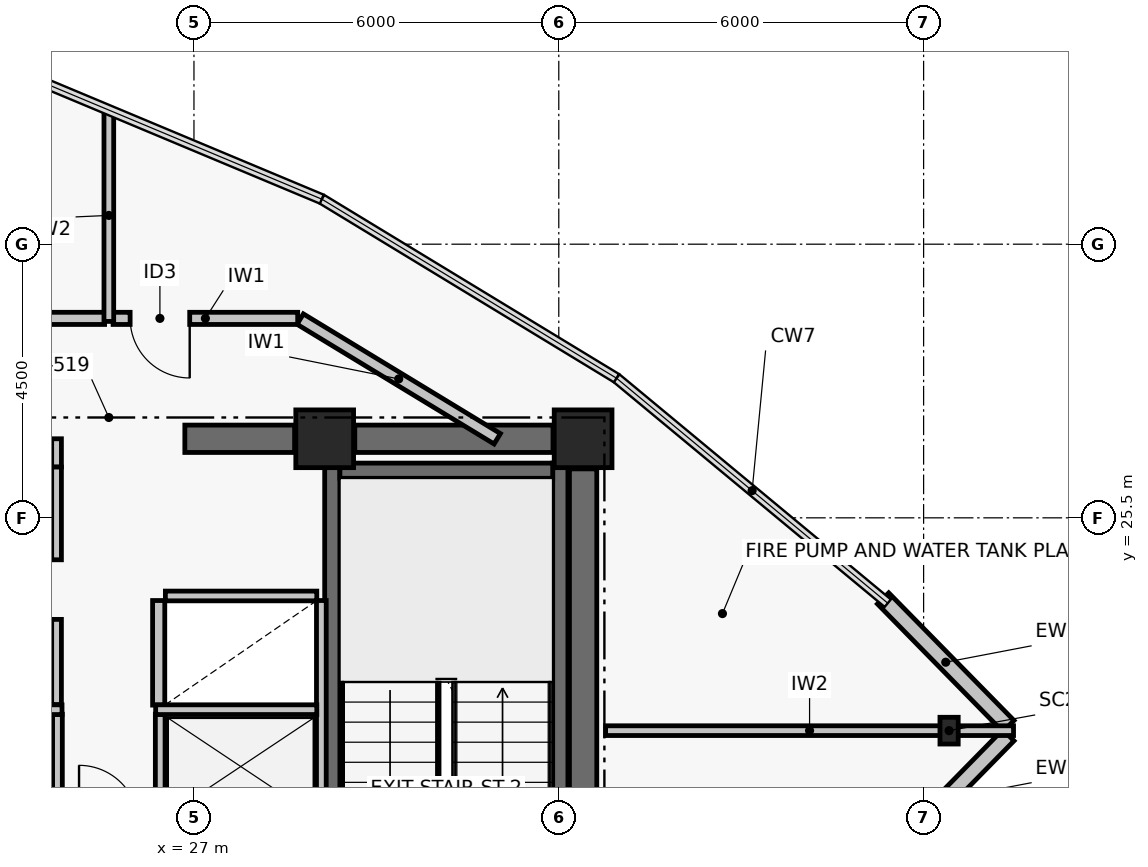
"""IFC4 building model, lengths in metres.
Left out: names, types, materials, properties, quantities, classifications, styles, units other than length and angle.
Written with IfcOpenShell. Run it as: python <this file> out.ifc"""

import sys

from ifc_helpers import new_model, si_unit, direction, frame, frame_2d, origin, origin_2d, place, context, subcontext, project, spatial, rectangle, i_section, extrude, element, fill, save


model = new_model("IFC4")
c1 = context("Model", 3, precision=1e-05, world=origin(), true_north=direction((0.0, 1.0)))
c2 = subcontext(c1, "Body", "Model", "MODEL_VIEW")
j1 = project(units=[si_unit("LENGTHUNIT", "METRE"), si_unit("PLANEANGLEUNIT", "RADIAN")], contexts=[c1])
p1 = place(None, origin())
s1 = spatial("IfcSite", under=j1, at=p1, CompositionType="ELEMENT")
p2 = place(p1, origin())
s2 = spatial("IfcBuilding", under=s1, at=p2, CompositionType="ELEMENT")
p3 = place(p2, frame((0.0, 0.0, 299.22)))
s3 = spatial("IfcBuildingStorey", under=s2, at=p3, CompositionType="ELEMENT", Elevation=299.22)
for number, where, z_axis, x_axis in (
    (1, (29.15, 26.8, 0.0), (0.0, 0.0, 1.0), (1.0, 0.0, 0.0)),
    (2, (33.4, 26.8, 0.0), (0.0, 0.0, 1.0), (1.0, 0.0, 0.0)),
):
    element("IfcColumn", number, at=place(p3, frame(where, z_axis=z_axis, x_axis=x_axis)), inside=s3, PredefinedType="COLUMN", context=c2, shape_type="SweptSolid", body=[
        extrude(rectangle(XDim=0.95, YDim=0.95, at=origin_2d()), origin(), (0.0, 0.0, 1.0), 3.2),
    ])
p4 = place(p3, frame((26.85, 26.8, 0.0), z_axis=(0.0, 0.0, 1.0), x_axis=(1.0, 0.0, 0.0)))
e3 = element("IfcWall", 3, at=p4, inside=s3, PredefinedType="SHEAR", context=c2, shape_type="SweptSolid", body=[
    extrude(rectangle(XDim=1.805, YDim=0.45, at=frame_2d((0.902, 0.0))), origin(), (0.0, 0.0, 1.0), 2.98),
])
p5 = place(p3, frame((29.645, 26.8, 0.0), z_axis=(0.0, 0.0, 1.0), x_axis=(1.0, 0.0, 0.0)))
e4 = element("IfcWall", 4, at=p5, inside=s3, PredefinedType="SHEAR", context=c2, shape_type="SweptSolid", body=[
    extrude(rectangle(XDim=3.26, YDim=0.45, at=frame_2d((1.63, 0.0))), origin(), (0.0, 0.0, 1.0), 2.98),
])
p6 = place(p3, frame((33.4, 17.695, 0.0), z_axis=(0.0, 0.0, 1.0), x_axis=(0.0, 1.0, 0.0)))
e5 = element("IfcWall", 5, at=p6, inside=s3, PredefinedType="SHEAR", context=c2, shape_type="SweptSolid", body=[
    extrude(rectangle(XDim=8.61, YDim=0.45, at=frame_2d((4.305, 0.0))), origin(), (0.0, 0.0, 1.0), 2.98),
])
p7 = place(p3, frame((29.275, 17.6, 0.0), z_axis=(0.0, 0.0, 1.0), x_axis=(0.0, 1.0, 0.0)))
e6 = element("IfcWall", 6, at=p7, inside=s3, PredefinedType="SHEAR", context=c2, shape_type="SweptSolid", body=[
    extrude(rectangle(XDim=8.8, YDim=0.25, at=frame_2d((4.4, 0.0))), origin(), (0.0, 0.0, 1.0), 2.98),
])
p8 = place(p7, frame((0.35, 0.0, 0.0)))
e7 = element("IfcOpeningElement", 7, at=p8, cuts=e6, PredefinedType="OPENING", context=c2, shape_type="SweptSolid", body=[
    extrude(rectangle(XDim=1.05, YDim=2.08, at=frame_2d((0.525, 1.04))), frame((0.0, 0.135, 0.0), z_axis=(0.0, -1.0, 0.0), x_axis=(1.0, 0.0, 0.0)), (0.0, 0.0, 1.0), 0.27),
])
p9 = place(p3, frame((33.025, 17.6, 0.0), z_axis=(0.0, 0.0, 1.0), x_axis=(0.0, 1.0, 0.0)))
e8 = element("IfcWall", 8, at=p9, inside=s3, PredefinedType="SHEAR", context=c2, shape_type="SweptSolid", body=[
    extrude(rectangle(XDim=8.8, YDim=0.25, at=frame_2d((4.4, 0.0))), origin(), (0.0, 0.0, 1.0), 2.98),
])
p10 = place(p3, frame((29.4, 26.275, 0.0), z_axis=(0.0, 0.0, 1.0), x_axis=(1.0, 0.0, 0.0)))
e9 = element("IfcWall", 9, at=p10, inside=s3, PredefinedType="SHEAR", context=c2, shape_type="SweptSolid", body=[
    extrude(rectangle(XDim=3.5, YDim=0.25, at=frame_2d((1.75, 0.0))), origin(), (0.0, 0.0, 1.0), 2.98),
])
p11 = place(p3, frame((39.419, 22.0, 0.0), z_axis=(0.0, 0.0, 1.0), x_axis=(1.0, 0.0, 0.0)))
e10 = element("IfcColumn", 10, at=p11, inside=s3, PredefinedType="COLUMN", context=c2, shape_type="SweptSolid", body=[
    extrude(i_section(OverallWidth=0.3, OverallDepth=0.44, WebThickness=0.011, FlangeThickness=0.018, at=origin_2d()), origin(), (0.0, 0.0, 1.0), 3.2),
])
for number, where, z_axis, x_axis in (
    (11, (40.394, 21.924, 0.0), (0.0, 0.0, 1.0), (-0.701, -0.714, 0.0)),
    (12, (38.333, 24.175, 0.0), (0.0, 0.0, 1.0), (0.701, -0.714, 0.0)),
):
    element("IfcWall", number, at=place(p3, frame(where, z_axis=z_axis, x_axis=x_axis)), inside=s3, PredefinedType="PARTITIONING", context=c2, shape_type="SweptSolid", body=[
        extrude(rectangle(XDim=2.941, YDim=0.26, at=frame_2d((1.471, 0.0))), origin(), (0.0, 0.0, 1.0), 2.98),
    ])
p12 = place(p3, frame((26.42, 22.42, 0.0), z_axis=(0.0, 0.0, 1.0), x_axis=(0.0, 1.0, 0.0)))
e13 = element("IfcWall", 13, at=p12, inside=s3, PredefinedType="PARTITIONING", context=c2, shape_type="SweptSolid", body=[
    extrude(rectangle(XDim=1.72, YDim=0.2, at=frame_2d((0.86, 0.0))), origin(), (0.0, 0.0, 1.0), 2.98),
])
p13 = place(p3, frame((24.755, 20.56, 0.0), z_axis=(0.0, 0.0, 1.0), x_axis=(0.0, 1.0, 0.0)))
e14 = element("IfcWall", 14, at=p13, inside=s3, PredefinedType="PARTITIONING", context=c2, shape_type="SweptSolid", body=[
    extrude(rectangle(XDim=1.71, YDim=0.16, at=frame_2d((0.855, 0.0))), origin(), (0.0, 0.0, 1.0), 2.98),
])
p14 = place(p3, frame((22.18, 22.345, 0.0), z_axis=(0.0, 0.0, 1.0), x_axis=(1.0, 0.0, 0.0)))
e15 = element("IfcWall", 15, at=p14, inside=s3, PredefinedType="PARTITIONING", context=c2, shape_type="SweptSolid", body=[
    extrude(rectangle(XDim=2.65, YDim=0.16, at=frame_2d((1.325, 0.0))), origin(), (0.0, 0.0, 1.0), 2.98),
])
p15 = place(p3, frame((29.095, 20.56, 0.0), z_axis=(0.0, 0.0, 1.0), x_axis=(0.0, 1.0, 0.0)))
e16 = element("IfcWall", 16, at=p15, inside=s3, PredefinedType="PARTITIONING", context=c2, shape_type="SweptSolid", body=[
    extrude(rectangle(XDim=3.58, YDim=0.16, at=frame_2d((1.79, 0.0))), origin(), (0.0, 0.0, 1.0), 2.98),
])
p16 = place(p3, frame((26.445, 20.56, 0.0), z_axis=(0.0, 0.0, 1.0), x_axis=(0.0, 1.0, 0.0)))
e17 = element("IfcWall", 17, at=p16, inside=s3, PredefinedType="PARTITIONING", context=c2, shape_type="SweptSolid", body=[
    extrude(rectangle(XDim=1.71, YDim=0.16, at=frame_2d((0.855, 0.0))), origin(), (0.0, 0.0, 1.0), 2.98),
])
p17 = place(p3, frame((26.37, 22.345, 0.0), z_axis=(0.0, 0.0, 1.0), x_axis=(1.0, 0.0, 0.0)))
e18 = element("IfcWall", 18, at=p17, inside=s3, PredefinedType="PARTITIONING", context=c2, shape_type="SweptSolid", body=[
    extrude(rectangle(XDim=2.65, YDim=0.16, at=frame_2d((1.325, 0.0))), origin(), (0.0, 0.0, 1.0), 2.98),
])
p18 = place(p3, frame((26.53, 24.215, 0.0), z_axis=(0.0, 0.0, 1.0), x_axis=(1.0, 0.0, 0.0)))
e19 = element("IfcWall", 19, at=p18, inside=s3, PredefinedType="PARTITIONING", context=c2, shape_type="SweptSolid", body=[
    extrude(rectangle(XDim=2.49, YDim=0.16, at=frame_2d((1.245, 0.0))), origin(), (0.0, 0.0, 1.0), 2.98),
])
p19 = place(p3, frame((24.74, 26.335, 0.0), z_axis=(0.0, 0.0, 1.0), x_axis=(0.0, 1.0, 0.0)))
e20 = element("IfcWall", 20, at=p19, inside=s3, PredefinedType="PARTITIONING", context=c2, shape_type="SweptSolid", body=[
    extrude(rectangle(XDim=0.465, YDim=0.16, at=frame_2d((0.232, 0.0))), origin(), (0.0, 0.0, 1.0), 2.11),
])
p20 = place(p3, frame((24.74, 22.43, 0.0), z_axis=(0.0, 0.0, 1.0), x_axis=(0.0, 1.0, 0.0)))
e21 = element("IfcWall", 21, at=p20, inside=s3, PredefinedType="PARTITIONING", context=c2, shape_type="SweptSolid", body=[
    extrude(rectangle(XDim=3.905, YDim=0.16, at=frame_2d((1.953, 0.0))), origin(), (0.0, 0.0, 1.0), 2.98),
])
p21 = place(p20, frame((1.4, 0.0, 0.0)))
e22 = element("IfcOpeningElement", 22, at=p21, cuts=e21, PredefinedType="OPENING", context=c2, shape_type="SweptSolid", body=[
    extrude(rectangle(XDim=0.98, YDim=2.06, at=frame_2d((0.49, 1.03))), frame((0.0, 0.09, 0.0), z_axis=(0.0, -1.0, 0.0), x_axis=(1.0, 0.0, 0.0)), (0.0, 0.0, 1.0), 0.18),
])
p22 = place(p3, frame((31.988, 26.8, 0.0), z_axis=(0.0, 0.0, 1.0), x_axis=(-0.854690580489, 0.519137757847, 0.0)))
e23 = element("IfcWall", 23, at=p22, inside=s3, PredefinedType="PARTITIONING", context=c2, shape_type="SweptSolid", body=[
    extrude(rectangle(XDim=3.792, YDim=0.2, at=frame_2d((1.896, 0.0))), origin(), (0.0, 0.0, 1.0), 2.11),
])
p23 = place(p3, frame((28.706, 28.78, 0.0), z_axis=(0.0, 0.0, 1.0), x_axis=(-1.0, 0.0, 0.0)))
e24 = element("IfcWall", 24, at=p23, inside=s3, PredefinedType="PARTITIONING", context=c2, shape_type="SweptSolid", body=[
    extrude(rectangle(XDim=3.036, YDim=0.2, at=frame_2d((1.518, 0.0))), origin(), (0.0, 0.0, 1.0), 2.98),
])
p24 = place(p23, frame((1.776, 0.0, 0.0)))
e25 = element("IfcOpeningElement", 25, at=p24, cuts=e24, PredefinedType="OPENING", context=c2, shape_type="SweptSolid", body=[
    extrude(rectangle(XDim=0.98, YDim=2.06, at=frame_2d((0.49, 1.03))), frame((0.0, 0.11, 0.0), z_axis=(0.0, -1.0, 0.0), x_axis=(1.0, 0.0, 0.0)), (0.0, 0.0, 1.0), 0.22),
])
p25 = place(p3, frame((25.53, 28.78, 0.0), z_axis=(0.0, 0.0, 1.0), x_axis=(-1.0, 0.0, 0.0)))
e26 = element("IfcWall", 26, at=p25, inside=s3, PredefinedType="PARTITIONING", context=c2, shape_type="SweptSolid", body=[
    extrude(rectangle(XDim=9.63, YDim=0.2, at=frame_2d((4.815, 0.0))), origin(), (0.0, 0.0, 1.0), 2.31),
])
p26 = place(p3, frame((25.6, 28.73, 0.0), z_axis=(0.0, 0.0, 1.0), x_axis=(0.0, 1.0, 0.0)))
e27 = element("IfcWall", 27, at=p26, inside=s3, PredefinedType="PARTITIONING", context=c2, shape_type="SweptSolid", body=[
    extrude(rectangle(XDim=3.487, YDim=0.16, at=frame_2d((1.743, 0.0))), origin(), (0.0, 0.0, 1.0), 2.46),
])
p27 = place(p3, frame((33.77, 22.0, 0.0), z_axis=(0.0, 0.0, 1.0), x_axis=(1.0, 0.0, 0.0)))
e28 = element("IfcWall", 28, at=p27, inside=s3, PredefinedType="PARTITIONING", context=c2, shape_type="SweptSolid", body=[
    extrude(rectangle(XDim=6.709, YDim=0.16, at=frame_2d((3.354, 0.0))), origin(), (0.0, 0.0, 1.0), 2.11),
])
p28 = place(p21, origin())
e29 = element("IfcDoor", 29, at=p28, inside=s3, OperationType="SINGLE_SWING_RIGHT", PredefinedType="DOOR", context=c2, shape_type="SweptSolid", body=[
    extrude(rectangle(XDim=0.98, YDim=2.06, at=frame_2d((0.49, 1.03))), frame((0.0, 0.025, 0.0), z_axis=(0.0, -1.0, 0.0), x_axis=(1.0, 0.0, 0.0)), (0.0, 0.0, 1.0), 0.05),
])
fill(e22, e29)
p29 = place(p24, origin())
e30 = element("IfcDoor", 30, at=p29, inside=s3, OperationType="SINGLE_SWING_LEFT", PredefinedType="DOOR", context=c2, shape_type="SweptSolid", body=[
    extrude(rectangle(XDim=0.98, YDim=2.06, at=frame_2d((0.49, 1.03))), frame((0.0, 0.025, 0.0), z_axis=(0.0, -1.0, 0.0), x_axis=(1.0, 0.0, 0.0)), (0.0, 0.0, 1.0), 0.05),
])
fill(e25, e30)
save(model, sys.argv[1])
